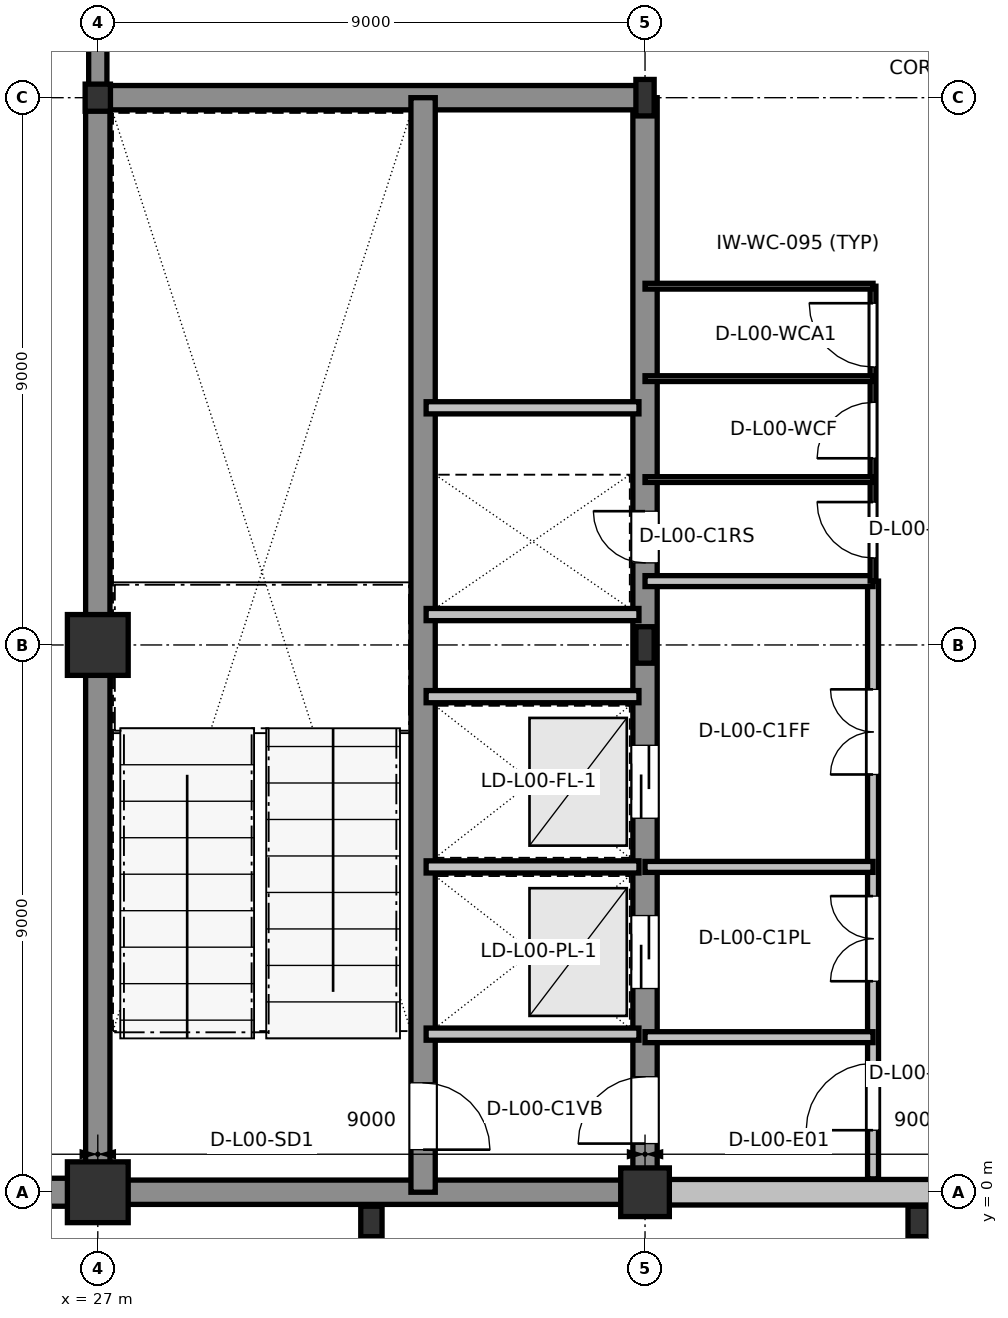
"""IFC4 building model, lengths in metres.
Left out: names, types, materials, properties, quantities, classifications, styles, units other than length and angle.
Written with IfcOpenShell. Run it as: python <this file> out.ifc"""

import sys

from ifc_helpers import new_model, si_unit, direction, frame, frame_2d, origin, origin_2d, place, context, subcontext, project, spatial, rectangle, i_section, extrude, element, fill, save


model = new_model("IFC4")
c1 = context("Model", 3, precision=1e-05, world=origin(), true_north=direction((0.0, 1.0)))
c2 = subcontext(c1, "Body", "Model", "MODEL_VIEW")
j1 = project(units=[si_unit("LENGTHUNIT", "METRE"), si_unit("PLANEANGLEUNIT", "RADIAN")], contexts=[c1])
p1 = place(None, origin())
s1 = spatial("IfcSite", under=j1, at=p1, CompositionType="ELEMENT")
p2 = place(p1, origin())
s2 = spatial("IfcBuilding", under=s1, at=p2, CompositionType="ELEMENT")
p3 = place(p2, origin())
s3 = spatial("IfcBuildingStorey", under=s2, at=p3, CompositionType="ELEMENT", Elevation=0.0)
for number, where, z_axis, x_axis in (
    (1, (31.5, -0.48, 0.0), (0.0, 0.0, 1.0), (1.0, 0.0, 0.0)),
    (2, (40.5, -0.48, 0.0), (0.0, 0.0, 1.0), (1.0, 0.0, 0.0)),
):
    element("IfcColumn", number, at=place(p3, frame(where, z_axis=z_axis, x_axis=x_axis)), inside=s3, PredefinedType="PILASTER", context=c2, shape_type="SweptSolid", body=[
        extrude(rectangle(XDim=0.35, YDim=0.5, at=origin_2d()), origin(), (0.0, 0.0, 1.0), 5.4),
    ])
for number, where, z_axis, x_axis in (
    (3, (27.0, 0.0, 0.0), (0.0, 0.0, 1.0), (1.0, 0.0, 0.0)),
    (4, (27.0, 9.0, 0.0), (0.0, 0.0, 1.0), (1.0, 0.0, 0.0)),
):
    element("IfcColumn", number, at=place(p3, frame(where, z_axis=z_axis, x_axis=x_axis)), inside=s3, PredefinedType="COLUMN", context=c2, shape_type="SweptSolid", body=[
        extrude(rectangle(XDim=1.0, YDim=1.0, at=origin_2d()), origin(), (0.0, 0.0, 1.0), 5.4),
    ])
p4 = place(p3, frame((27.0, 18.0, 0.0), z_axis=(0.0, 0.0, 1.0), x_axis=(1.0, 0.0, 0.0)))
e5 = element("IfcColumn", 5, at=p4, inside=s3, PredefinedType="COLUMN", context=c2, shape_type="SweptSolid", body=[
    extrude(i_section(OverallWidth=0.416, OverallDepth=0.446, WebThickness=0.025, FlangeThickness=0.04, at=origin_2d()), origin(), (0.0, 0.0, 1.0), 5.4),
])
p5 = place(p3, frame((36.0, 0.0, 0.0), z_axis=(0.0, 0.0, 1.0), x_axis=(1.0, 0.0, 0.0)))
e6 = element("IfcColumn", 6, at=p5, inside=s3, PredefinedType="COLUMN", context=c2, shape_type="SweptSolid", body=[
    extrude(rectangle(XDim=0.8, YDim=0.8, at=origin_2d()), origin(), (0.0, 0.0, 1.0), 5.4),
])
for number, where, z_axis, x_axis in (
    (7, (36.0, 9.0, 0.0), (0.0, 0.0, 1.0), (1.0, 0.0, 0.0)),
    (8, (36.0, 18.0, 0.0), (0.0, 0.0, 1.0), (1.0, 0.0, 0.0)),
):
    element("IfcColumn", number, at=place(p3, frame(where, z_axis=z_axis, x_axis=x_axis)), inside=s3, PredefinedType="COLUMN", context=c2, shape_type="SweptSolid", body=[
        extrude(i_section(OverallWidth=0.3, OverallDepth=0.6, WebThickness=0.015, FlangeThickness=0.03, at=origin_2d()), origin(), (0.0, 0.0, 1.0), 5.4),
    ])
p6 = place(p3, frame((18.335, 0.0, 0.0), z_axis=(0.0, 0.0, 1.0), x_axis=(1.0, 0.0, 0.0)))
e9 = element("IfcWall", 9, at=p6, inside=s3, PredefinedType="STANDARD", context=c2, shape_type="SweptSolid", body=[
    extrude(rectangle(XDim=8.18, YDim=0.46, at=frame_2d((4.09, 0.0))), origin(), (0.0, 0.0, 1.0), 5.4),
])
p7 = place(p3, frame((36.385, 0.0, 0.0), z_axis=(0.0, 0.0, 1.0), x_axis=(1.0, 0.0, 0.0)))
e10 = element("IfcWall", 10, at=p7, inside=s3, PredefinedType="STANDARD", context=c2, shape_type="SweptSolid", body=[
    extrude(rectangle(XDim=8.23, YDim=0.42, at=frame_2d((4.115, 0.0))), origin(), (0.0, 0.0, 1.0), 3.79),
])
p8 = place(p7, frame((0.765, 0.0, 0.0)))
e11 = element("IfcOpeningElement", 11, at=p8, cuts=e10, PredefinedType="OPENING", context=c2, shape_type="SweptSolid", body=[
    extrude(rectangle(XDim=2.1, YDim=2.6, at=frame_2d((1.05, 1.3))), frame((0.0, 0.22, 0.0), z_axis=(0.0, -1.0, 0.0), x_axis=(1.0, 0.0, 0.0)), (0.0, 0.0, 1.0), 0.44),
])
p9 = place(p3, frame((27.0, 0.0, 0.0), z_axis=(0.0, 0.0, 1.0), x_axis=(1.0, 0.0, 0.0)))
e12 = element("IfcWall", 12, at=p9, inside=s3, PredefinedType="SHEAR", context=c2, shape_type="SweptSolid", body=[
    extrude(rectangle(XDim=9.0, YDim=0.4, at=frame_2d((4.5, 0.0))), origin(), (0.0, 0.0, 1.0), 5.16),
])
p10 = place(p9, frame((1.8, 0.0, 0.0)))
e13 = element("IfcOpeningElement", 13, at=p10, cuts=e12, PredefinedType="OPENING", context=c2, shape_type="SweptSolid", body=[
    extrude(rectangle(XDim=1.8, YDim=2.35, at=frame_2d((0.9, 1.175))), frame((0.0, 0.21, 0.0), z_axis=(0.0, -1.0, 0.0), x_axis=(1.0, 0.0, 0.0)), (0.0, 0.0, 1.0), 0.42),
])
p11 = place(p3, frame((36.0, 0.0, 0.0), z_axis=(0.0, 0.0, 1.0), x_axis=(0.0, 1.0, 0.0)))
e14 = element("IfcWall", 14, at=p11, inside=s3, PredefinedType="SHEAR", context=c2, shape_type="SweptSolid", body=[
    extrude(rectangle(XDim=18.0, YDim=0.4, at=frame_2d((9.0, 0.0))), origin(), (0.0, 0.0, 1.0), 5.16),
])
p12 = place(p11, frame((0.8, 0.0, 0.0)))
e15 = element("IfcOpeningElement", 15, at=p12, cuts=e14, PredefinedType="OPENING", context=c2, shape_type="SweptSolid", body=[
    extrude(rectangle(XDim=1.1, YDim=2.16, at=frame_2d((0.55, 1.08))), frame((0.0, 0.21, 0.0), z_axis=(0.0, -1.0, 0.0), x_axis=(1.0, 0.0, 0.0)), (0.0, 0.0, 1.0), 0.42),
])
p13 = place(p11, frame((3.35, 0.0, 0.0)))
e16 = element("IfcOpeningElement", 16, at=p13, cuts=e14, PredefinedType="OPENING", context=c2, shape_type="SweptSolid", body=[
    extrude(rectangle(XDim=1.2, YDim=2.2, at=frame_2d((0.6, 1.1))), frame((0.0, 0.21, 0.0), z_axis=(0.0, -1.0, 0.0), x_axis=(1.0, 0.0, 0.0)), (0.0, 0.0, 1.0), 0.42),
])
p14 = place(p11, frame((6.15, 0.0, 0.0)))
e17 = element("IfcOpeningElement", 17, at=p14, cuts=e14, PredefinedType="OPENING", context=c2, shape_type="SweptSolid", body=[
    extrude(rectangle(XDim=1.2, YDim=2.2, at=frame_2d((0.6, 1.1))), frame((0.0, 0.21, 0.0), z_axis=(0.0, -1.0, 0.0), x_axis=(1.0, 0.0, 0.0)), (0.0, 0.0, 1.0), 0.42),
])
p15 = place(p11, frame((10.35, 0.0, 0.0)))
e18 = element("IfcOpeningElement", 18, at=p15, cuts=e14, PredefinedType="OPENING", context=c2, shape_type="SweptSolid", body=[
    extrude(rectangle(XDim=0.85, YDim=2.1, at=frame_2d((0.425, 1.05))), frame((0.0, 0.21, 0.0), z_axis=(0.0, -1.0, 0.0), x_axis=(1.0, 0.0, 0.0)), (0.0, 0.0, 1.0), 0.42),
])
p16 = place(p3, frame((36.0, 18.0, 0.0), z_axis=(0.0, 0.0, 1.0), x_axis=(-1.0, 0.0, 0.0)))
e19 = element("IfcWall", 19, at=p16, inside=s3, PredefinedType="SHEAR", context=c2, shape_type="SweptSolid", body=[
    extrude(rectangle(XDim=9.0, YDim=0.4, at=frame_2d((4.5, 0.0))), origin(), (0.0, 0.0, 1.0), 5.16),
])
p17 = place(p3, frame((27.0, 18.0, 0.0), z_axis=(0.0, 0.0, 1.0), x_axis=(0.0, -1.0, 0.0)))
e20 = element("IfcWall", 20, at=p17, inside=s3, PredefinedType="SHEAR", context=c2, shape_type="SweptSolid", body=[
    extrude(rectangle(XDim=18.0, YDim=0.4, at=frame_2d((9.0, 0.0))), origin(), (0.0, 0.0, 1.0), 5.16),
])
p18 = place(p3, frame((32.35, 0.0, 0.0), z_axis=(0.0, 0.0, 1.0), x_axis=(0.0, 1.0, 0.0)))
e21 = element("IfcWall", 21, at=p18, inside=s3, PredefinedType="SHEAR", context=c2, shape_type="SweptSolid", body=[
    extrude(rectangle(XDim=18.0, YDim=0.4, at=frame_2d((9.0, 0.0))), origin(), (0.0, 0.0, 1.0), 5.16),
])
p19 = place(p18, frame((0.7, 0.0, 0.0)))
e22 = element("IfcOpeningElement", 22, at=p19, cuts=e21, PredefinedType="OPENING", context=c2, shape_type="SweptSolid", body=[
    extrude(rectangle(XDim=1.1, YDim=2.16, at=frame_2d((0.55, 1.08))), frame((0.0, 0.21, 0.0), z_axis=(0.0, -1.0, 0.0), x_axis=(1.0, 0.0, 0.0)), (0.0, 0.0, 1.0), 0.42),
])
for number, where, z_axis, x_axis in (
    (23, (32.4, 2.6, 0.0), (0.0, 0.0, 1.0), (1.0, 0.0, 0.0)),
    (24, (32.4, 5.35, 0.0), (0.0, 0.0, 1.0), (1.0, 0.0, 0.0)),
    (25, (32.4, 8.15, 0.0), (0.0, 0.0, 1.0), (1.0, 0.0, 0.0)),
    (26, (32.4, 9.5, 0.0), (0.0, 0.0, 1.0), (1.0, 0.0, 0.0)),
    (27, (32.4, 12.9, 0.0), (0.0, 0.0, 1.0), (1.0, 0.0, 0.0)),
):
    element("IfcWall", number, at=place(p3, frame(where, z_axis=z_axis, x_axis=x_axis)), inside=s3, PredefinedType="PARTITIONING", context=c2, shape_type="SweptSolid", body=[
        extrude(rectangle(XDim=3.5, YDim=0.2, at=frame_2d((1.75, 0.0))), origin(), (0.0, 0.0, 1.0), 5.16),
    ])
p20 = place(p3, frame((39.75, 0.22, 0.0), z_axis=(0.0, 0.0, 1.0), x_axis=(0.0, 1.0, 0.0)))
e28 = element("IfcWall", 28, at=p20, inside=s3, PredefinedType="PARTITIONING", context=c2, shape_type="SweptSolid", body=[
    extrude(rectangle(XDim=9.83, YDim=0.18, at=frame_2d((4.915, 0.0))), origin(), (0.0, 0.0, 1.0), 5.16),
])
p21 = place(p20, frame((0.8, 0.0, 0.0)))
e29 = element("IfcOpeningElement", 29, at=p21, cuts=e28, PredefinedType="OPENING", context=c2, shape_type="SweptSolid", body=[
    extrude(rectangle(XDim=1.1, YDim=2.16, at=frame_2d((0.55, 1.08))), frame((0.0, 0.1, 0.0), z_axis=(0.0, -1.0, 0.0), x_axis=(1.0, 0.0, 0.0)), (0.0, 0.0, 1.0), 0.2),
])
p22 = place(p20, frame((3.25, 0.0, 0.0)))
e30 = element("IfcOpeningElement", 30, at=p22, cuts=e28, PredefinedType="OPENING", context=c2, shape_type="SweptSolid", body=[
    extrude(rectangle(XDim=1.4, YDim=2.2, at=frame_2d((0.7, 1.1))), frame((0.0, 0.1, 0.0), z_axis=(0.0, -1.0, 0.0), x_axis=(1.0, 0.0, 0.0)), (0.0, 0.0, 1.0), 0.2),
])
p23 = place(p20, frame((6.65, 0.0, 0.0)))
e31 = element("IfcOpeningElement", 31, at=p23, cuts=e28, PredefinedType="OPENING", context=c2, shape_type="SweptSolid", body=[
    extrude(rectangle(XDim=1.4, YDim=2.2, at=frame_2d((0.7, 1.1))), frame((0.0, 0.1, 0.0), z_axis=(0.0, -1.0, 0.0), x_axis=(1.0, 0.0, 0.0)), (0.0, 0.0, 1.0), 0.2),
])
for number, where, z_axis, x_axis in (
    (32, (36.0, 2.55, 0.0), (0.0, 0.0, 1.0), (1.0, 0.0, 0.0)),
    (33, (36.0, 5.35, 0.0), (0.0, 0.0, 1.0), (1.0, 0.0, 0.0)),
    (34, (36.0, 10.05, 0.0), (0.0, 0.0, 1.0), (1.0, 0.0, 0.0)),
):
    element("IfcWall", number, at=place(p3, frame(where, z_axis=z_axis, x_axis=x_axis)), inside=s3, PredefinedType="PARTITIONING", context=c2, shape_type="SweptSolid", body=[
        extrude(rectangle(XDim=3.75, YDim=0.18, at=frame_2d((1.875, 0.0))), origin(), (0.0, 0.0, 1.0), 5.16),
    ])
p24 = place(p3, frame((39.75, 10.05, 0.0), z_axis=(0.0, 0.0, 1.0), x_axis=(0.0, 1.0, 0.0)))
e35 = element("IfcWall", 35, at=p24, inside=s3, PredefinedType="PARTITIONING", context=c2, shape_type="SweptSolid", body=[
    extrude(rectangle(XDim=4.85, YDim=0.095, at=frame_2d((2.425, 0.0))), origin(), (0.0, 0.0, 1.0), 5.16),
])
p25 = place(p24, frame((0.38, 0.0, 0.0)))
e36 = element("IfcOpeningElement", 36, at=p25, cuts=e35, PredefinedType="OPENING", context=c2, shape_type="SweptSolid", body=[
    extrude(rectangle(XDim=0.92, YDim=2.1, at=frame_2d((0.46, 1.05))), frame((0.0, 0.057, 0.0), z_axis=(0.0, -1.0, 0.0), x_axis=(1.0, 0.0, 0.0)), (0.0, 0.0, 1.0), 0.115),
])
p26 = place(p24, frame((2.02, 0.0, 0.0)))
e37 = element("IfcOpeningElement", 37, at=p26, cuts=e35, PredefinedType="OPENING", context=c2, shape_type="SweptSolid", body=[
    extrude(rectangle(XDim=0.92, YDim=2.1, at=frame_2d((0.46, 1.05))), frame((0.0, 0.057, 0.0), z_axis=(0.0, -1.0, 0.0), x_axis=(1.0, 0.0, 0.0)), (0.0, 0.0, 1.0), 0.115),
])
p27 = place(p24, frame((3.52, 0.0, 0.0)))
e38 = element("IfcOpeningElement", 38, at=p27, cuts=e35, PredefinedType="OPENING", context=c2, shape_type="SweptSolid", body=[
    extrude(rectangle(XDim=1.05, YDim=2.13, at=frame_2d((0.525, 1.065))), frame((0.0, 0.057, 0.0), z_axis=(0.0, -1.0, 0.0), x_axis=(1.0, 0.0, 0.0)), (0.0, 0.0, 1.0), 0.115),
])
for number, where, z_axis, x_axis in (
    (39, (36.0, 11.72, 0.0), (0.0, 0.0, 1.0), (1.0, 0.0, 0.0)),
    (40, (36.0, 13.38, 0.0), (0.0, 0.0, 1.0), (1.0, 0.0, 0.0)),
):
    element("IfcWall", number, at=place(p3, frame(where, z_axis=z_axis, x_axis=x_axis)), inside=s3, PredefinedType="PARTITIONING", context=c2, shape_type="SweptSolid", body=[
        extrude(rectangle(XDim=3.75, YDim=0.095, at=frame_2d((1.875, 0.0))), origin(), (0.0, 0.0, 1.0), 5.16),
    ])
p28 = place(p3, frame((36.0, 14.9, 0.0), z_axis=(0.0, 0.0, 1.0), x_axis=(1.0, 0.0, 0.0)))
e41 = element("IfcWall", 41, at=p28, inside=s3, PredefinedType="PARTITIONING", context=c2, shape_type="SweptSolid", body=[
    extrude(rectangle(XDim=3.75, YDim=0.095, at=frame_2d((1.875, 0.0))), origin(), (0.0, 0.0, 1.0), 4.745),
])
p29 = place(p3, frame((27.0, 18.0, 0.0), z_axis=(0.0, 0.0, 1.0), x_axis=(0.0, 1.0, 0.0)))
e42 = element("IfcWall", 42, at=p29, inside=s3, PredefinedType="SHEAR", context=c2, shape_type="SweptSolid", body=[
    extrude(rectangle(XDim=9.0, YDim=0.3, at=frame_2d((4.5, 0.0))), origin(), (0.0, 0.0, 1.0), 5.16),
])
p30 = place(p29, frame((1.8, 0.0, 0.0)))
e43 = element("IfcOpeningElement", 43, at=p30, cuts=e42, PredefinedType="OPENING", context=c2, shape_type="SweptSolid", body=[
    extrude(rectangle(XDim=1.8, YDim=2.28, at=frame_2d((0.9, 1.14))), frame((0.0, 0.16, 0.0), z_axis=(0.0, -1.0, 0.0), x_axis=(1.0, 0.0, 0.0)), (0.0, 0.0, 1.0), 0.32),
])
p31 = place(p29, frame((5.1, 0.0, 0.0)))
e44 = element("IfcOpeningElement", 44, at=p31, cuts=e42, PredefinedType="OPENING", context=c2, shape_type="SweptSolid", body=[
    extrude(rectangle(XDim=1.8, YDim=2.28, at=frame_2d((0.9, 1.14))), frame((0.0, 0.16, 0.0), z_axis=(0.0, -1.0, 0.0), x_axis=(1.0, 0.0, 0.0)), (0.0, 0.0, 1.0), 0.32),
])
p32 = place(p8, frame((2.1, 0.0, 0.0), z_axis=(0.0, 0.0, 1.0), x_axis=(-1.0, 0.0, 0.0)))
e45 = element("IfcDoor", 45, at=p32, inside=s3, OperationType="DOUBLE_DOOR_SINGLE_SWING", PredefinedType="DOOR", context=c2, shape_type="SweptSolid", body=[
    extrude(rectangle(XDim=2.1, YDim=2.6, at=frame_2d((1.05, 1.3))), frame((0.0, 0.025, 0.0), z_axis=(0.0, -1.0, 0.0), x_axis=(1.0, 0.0, 0.0)), (0.0, 0.0, 1.0), 0.05),
])
fill(e11, e45)
p33 = place(p10, frame((1.8, 0.0, 0.0), z_axis=(0.0, 0.0, 1.0), x_axis=(-1.0, 0.0, 0.0)))
e46 = element("IfcDoor", 46, at=p33, inside=s3, OperationType="DOUBLE_DOOR_SINGLE_SWING", PredefinedType="DOOR", context=c2, shape_type="SweptSolid", body=[
    extrude(rectangle(XDim=1.8, YDim=2.35, at=frame_2d((0.9, 1.175))), frame((0.0, 0.025, 0.0), z_axis=(0.0, -1.0, 0.0), x_axis=(1.0, 0.0, 0.0)), (0.0, 0.0, 1.0), 0.05),
])
fill(e13, e46)
p34 = place(p19, frame((1.1, 0.0, 0.0), z_axis=(0.0, 0.0, 1.0), x_axis=(-1.0, 0.0, 0.0)))
e47 = element("IfcDoor", 47, at=p34, inside=s3, OperationType="SINGLE_SWING_RIGHT", PredefinedType="DOOR", context=c2, shape_type="SweptSolid", body=[
    extrude(rectangle(XDim=1.1, YDim=2.16, at=frame_2d((0.55, 1.08))), frame((0.0, 0.025, 0.0), z_axis=(0.0, -1.0, 0.0), x_axis=(1.0, 0.0, 0.0)), (0.0, 0.0, 1.0), 0.05),
])
fill(e22, e47)
p35 = place(p12, origin())
e48 = element("IfcDoor", 48, at=p35, inside=s3, OperationType="SINGLE_SWING_LEFT", PredefinedType="DOOR", context=c2, shape_type="SweptSolid", body=[
    extrude(rectangle(XDim=1.1, YDim=2.16, at=frame_2d((0.55, 1.08))), frame((0.0, 0.025, 0.0), z_axis=(0.0, -1.0, 0.0), x_axis=(1.0, 0.0, 0.0)), (0.0, 0.0, 1.0), 0.05),
])
fill(e15, e48)
p36 = place(p13, origin())
e49 = element("IfcDoor", 49, at=p36, inside=s3, OperationType="SLIDING_TO_LEFT", PredefinedType="DOOR", context=c2, shape_type="SweptSolid", body=[
    extrude(rectangle(XDim=1.2, YDim=2.2, at=frame_2d((0.6, 1.1))), frame((0.0, 0.025, 0.0), z_axis=(0.0, -1.0, 0.0), x_axis=(1.0, 0.0, 0.0)), (0.0, 0.0, 1.0), 0.05),
])
fill(e16, e49)
p37 = place(p14, origin())
e50 = element("IfcDoor", 50, at=p37, inside=s3, OperationType="SLIDING_TO_LEFT", PredefinedType="DOOR", context=c2, shape_type="SweptSolid", body=[
    extrude(rectangle(XDim=1.2, YDim=2.2, at=frame_2d((0.6, 1.1))), frame((0.0, 0.025, 0.0), z_axis=(0.0, -1.0, 0.0), x_axis=(1.0, 0.0, 0.0)), (0.0, 0.0, 1.0), 0.05),
])
fill(e17, e50)
p38 = place(p15, origin())
e51 = element("IfcDoor", 51, at=p38, inside=s3, OperationType="SINGLE_SWING_RIGHT", PredefinedType="DOOR", context=c2, shape_type="SweptSolid", body=[
    extrude(rectangle(XDim=0.85, YDim=2.1, at=frame_2d((0.425, 1.05))), frame((0.0, 0.025, 0.0), z_axis=(0.0, -1.0, 0.0), x_axis=(1.0, 0.0, 0.0)), (0.0, 0.0, 1.0), 0.05),
])
fill(e18, e51)
p39 = place(p21, origin())
e52 = element("IfcDoor", 52, at=p39, inside=s3, OperationType="SINGLE_SWING_LEFT", PredefinedType="DOOR", context=c2, shape_type="SweptSolid", body=[
    extrude(rectangle(XDim=1.1, YDim=2.16, at=frame_2d((0.55, 1.08))), frame((0.0, 0.025, 0.0), z_axis=(0.0, -1.0, 0.0), x_axis=(1.0, 0.0, 0.0)), (0.0, 0.0, 1.0), 0.05),
])
fill(e29, e52)
p40 = place(p22, origin())
e53 = element("IfcDoor", 53, at=p40, inside=s3, OperationType="DOUBLE_DOOR_SINGLE_SWING", PredefinedType="DOOR", context=c2, shape_type="SweptSolid", body=[
    extrude(rectangle(XDim=1.4, YDim=2.2, at=frame_2d((0.7, 1.1))), frame((0.0, 0.025, 0.0), z_axis=(0.0, -1.0, 0.0), x_axis=(1.0, 0.0, 0.0)), (0.0, 0.0, 1.0), 0.05),
])
fill(e30, e53)
p41 = place(p23, origin())
e54 = element("IfcDoor", 54, at=p41, inside=s3, OperationType="DOUBLE_DOOR_SINGLE_SWING", PredefinedType="DOOR", context=c2, shape_type="SweptSolid", body=[
    extrude(rectangle(XDim=1.4, YDim=2.2, at=frame_2d((0.7, 1.1))), frame((0.0, 0.025, 0.0), z_axis=(0.0, -1.0, 0.0), x_axis=(1.0, 0.0, 0.0)), (0.0, 0.0, 1.0), 0.05),
])
fill(e31, e54)
p42 = place(p25, origin())
e55 = element("IfcDoor", 55, at=p42, inside=s3, OperationType="SINGLE_SWING_RIGHT", PredefinedType="DOOR", context=c2, shape_type="SweptSolid", body=[
    extrude(rectangle(XDim=0.92, YDim=2.1, at=frame_2d((0.46, 1.05))), frame((0.0, 0.025, 0.0), z_axis=(0.0, -1.0, 0.0), x_axis=(1.0, 0.0, 0.0)), (0.0, 0.0, 1.0), 0.05),
])
fill(e36, e55)
p43 = place(p26, origin())
e56 = element("IfcDoor", 56, at=p43, inside=s3, OperationType="SINGLE_SWING_LEFT", PredefinedType="DOOR", context=c2, shape_type="SweptSolid", body=[
    extrude(rectangle(XDim=0.92, YDim=2.1, at=frame_2d((0.46, 1.05))), frame((0.0, 0.025, 0.0), z_axis=(0.0, -1.0, 0.0), x_axis=(1.0, 0.0, 0.0)), (0.0, 0.0, 1.0), 0.05),
])
fill(e37, e56)
p44 = place(p27, origin())
e57 = element("IfcDoor", 57, at=p44, inside=s3, OperationType="SINGLE_SWING_RIGHT", PredefinedType="DOOR", context=c2, shape_type="SweptSolid", body=[
    extrude(rectangle(XDim=1.05, YDim=2.13, at=frame_2d((0.525, 1.065))), frame((0.0, 0.025, 0.0), z_axis=(0.0, -1.0, 0.0), x_axis=(1.0, 0.0, 0.0)), (0.0, 0.0, 1.0), 0.05),
])
fill(e38, e57)
save(model, sys.argv[1])
